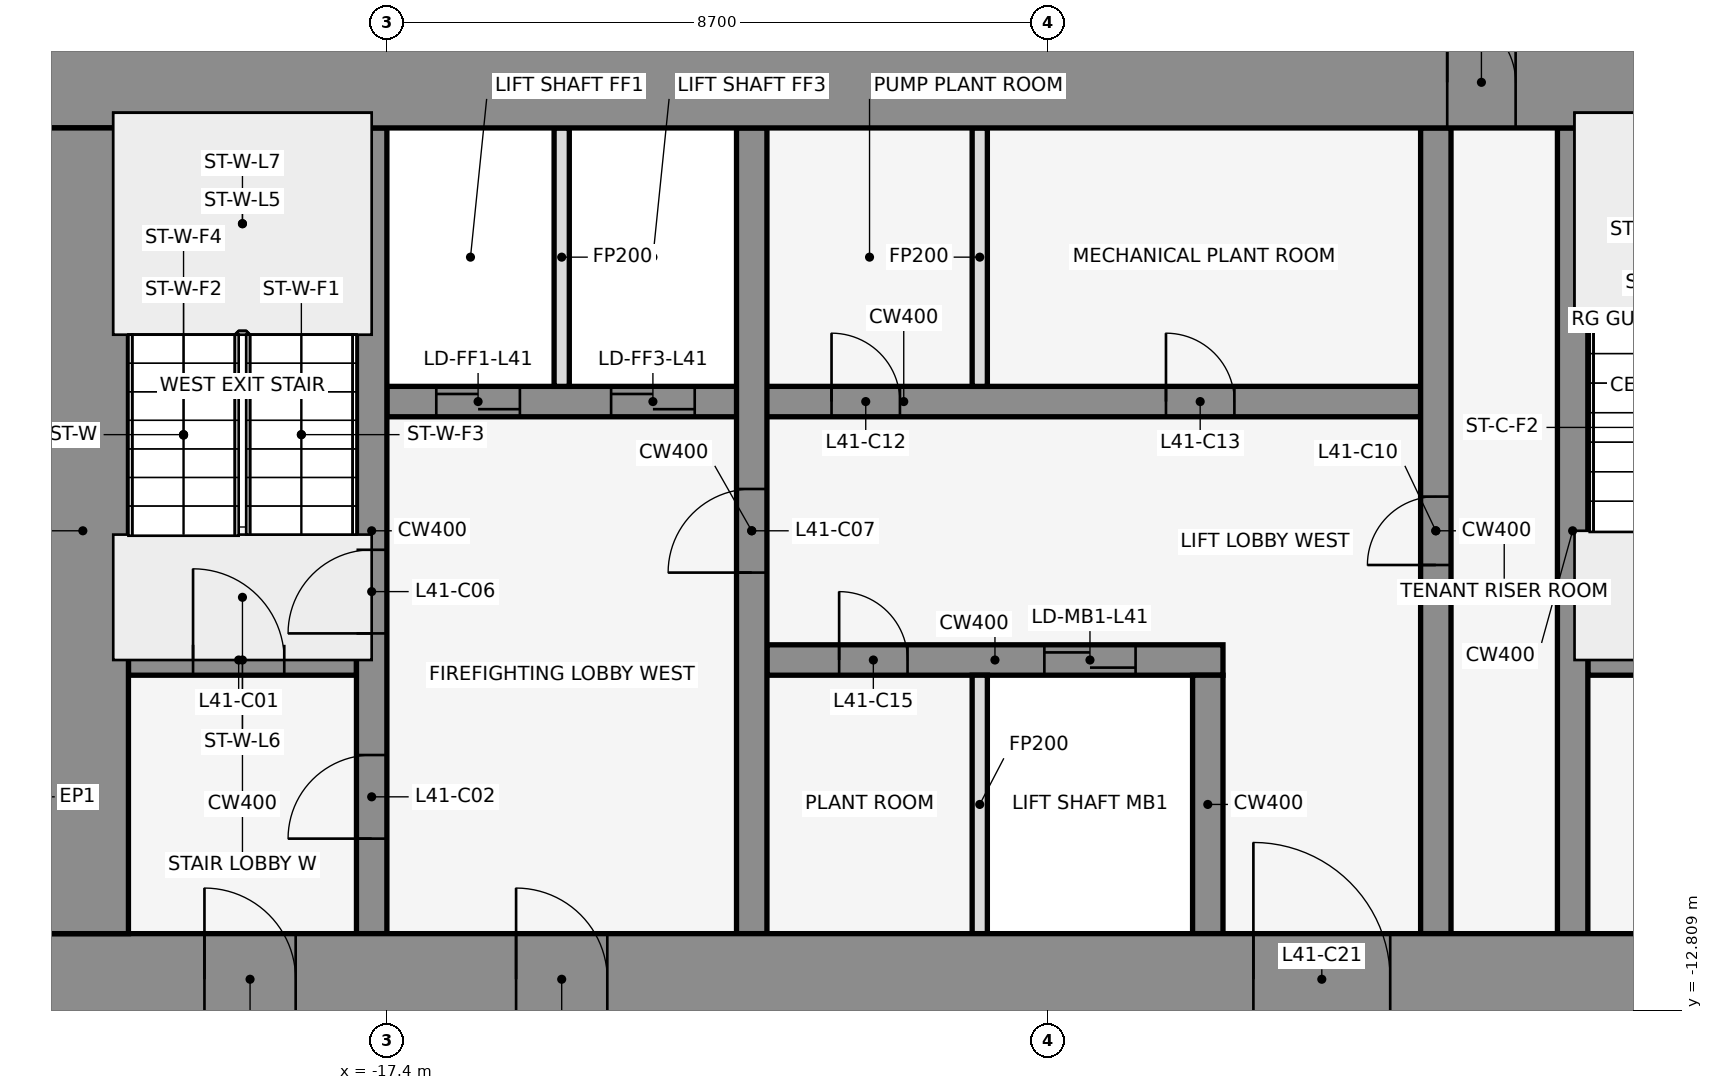
"""IFC4 building model, lengths in metres.
Left out: names, types, materials, properties, quantities, classifications, styles, units other than length and angle.
Written with IfcOpenShell. Run it as: python <this file> out.ifc"""

import sys

from ifc_helpers import new_model, si_unit, direction, frame, frame_2d, origin, place, context, subcontext, project, spatial, rectangle, extrude, element, fill, save


model = new_model("IFC4")
c1 = context("Model", 3, precision=1e-05, world=origin(), true_north=direction((0.0, 1.0)))
c2 = subcontext(c1, "Body", "Model", "MODEL_VIEW")
j1 = project(units=[si_unit("LENGTHUNIT", "METRE"), si_unit("PLANEANGLEUNIT", "RADIAN")], contexts=[c1])
p1 = place(None, origin())
s1 = spatial("IfcSite", under=j1, at=p1, CompositionType="ELEMENT")
p2 = place(p1, origin())
s2 = spatial("IfcBuilding", under=s1, at=p2, CompositionType="ELEMENT")
p3 = place(p2, frame((0.0, 0.0, 185.5)))
s3 = spatial("IfcBuildingStorey", under=s2, at=p3, CompositionType="ELEMENT", Elevation=185.5)
for number, where, z_axis, x_axis in (
    (1, (-0.068, -0.105, 0.0), (0.0, 0.0, 1.0), (-0.84, 0.543, 0.0)),
    (2, (-14.599, 1.08, 0.0), (0.0, 0.0, 1.0), (-0.84, -0.543, 0.0)),
):
    element("IfcWall", number, at=place(p3, frame(where, z_axis=z_axis, x_axis=x_axis)), inside=s3, PredefinedType="STANDARD", context=c2, shape_type="SweptSolid", body=[
        extrude(rectangle(XDim=2.183, YDim=0.25, at=frame_2d((1.091, 0.0))), origin(), (0.0, 0.0, 1.0), 5.25),
    ])
p4 = place(p3, frame((-20.8, -8.2, 0.0), z_axis=(0.0, 0.0, 1.0), x_axis=(1.0, 0.0, 0.0)))
e3 = element("IfcWall", 3, at=p4, inside=s3, PredefinedType="SHEAR", context=c2, shape_type="SweptSolid", body=[
    extrude(rectangle(XDim=3.0, YDim=0.4, at=frame_2d((1.5, 0.0))), origin(), (0.0, 0.0, 1.0), 5.4),
])
p5 = place(p4, frame((0.85, 0.0, 0.0)))
e4 = element("IfcOpeningElement", 4, at=p5, cuts=e3, PredefinedType="OPENING", context=c2, shape_type="SweptSolid", body=[
    extrude(rectangle(XDim=1.2, YDim=2.1, at=frame_2d((0.6, 1.05))), frame((0.0, 0.212, 0.0), z_axis=(0.0, -1.0, 0.0), x_axis=(1.0, 0.0, 0.0)), (0.0, 0.0, 1.0), 0.424),
])
p6 = place(p3, frame((-12.4, -8.2, 0.0), z_axis=(0.0, 0.0, 1.0), x_axis=(1.0, 0.0, 0.0)))
e5 = element("IfcWall", 5, at=p6, inside=s3, PredefinedType="SHEAR", context=c2, shape_type="SweptSolid", body=[
    extrude(rectangle(XDim=6.0, YDim=0.4, at=frame_2d((3.0, 0.0))), origin(), (0.0, 0.0, 1.0), 5.4),
])
p7 = place(p6, frame((3.65, 0.0, 0.0)))
e6 = element("IfcOpeningElement", 6, at=p7, cuts=e5, PredefinedType="OPENING", context=c2, shape_type="SweptSolid", body=[
    extrude(rectangle(XDim=1.2, YDim=2.1, at=frame_2d((0.6, 1.05))), frame((0.0, 0.212, 0.0), z_axis=(0.0, -1.0, 0.0), x_axis=(1.0, 0.0, 0.0)), (0.0, 0.0, 1.0), 0.424),
])
p8 = place(p6, frame((0.95, 0.0, 0.0)))
e7 = element("IfcOpeningElement", 7, at=p8, cuts=e5, PredefinedType="OPENING", context=c2, shape_type="SweptSolid", body=[
    extrude(rectangle(XDim=0.9, YDim=2.1, at=frame_2d((0.45, 1.05))), frame((0.0, 0.212, 0.0), z_axis=(0.0, -1.0, 0.0), x_axis=(1.0, 0.0, 0.0)), (0.0, 0.0, 1.0), 0.424),
])
p9 = place(p3, frame((-1.6, -8.2, 0.0), z_axis=(0.0, 0.0, 1.0), x_axis=(1.0, 0.0, 0.0)))
e8 = element("IfcWall", 8, at=p9, inside=s3, PredefinedType="SHEAR", context=c2, shape_type="SweptSolid", body=[
    extrude(rectangle(XDim=3.2, YDim=0.4, at=frame_2d((1.6, 0.0))), origin(), (0.0, 0.0, 1.0), 5.4),
])
p10 = place(p9, frame((1.05, 0.0, 0.0)))
e9 = element("IfcOpeningElement", 9, at=p10, cuts=e8, PredefinedType="OPENING", context=c2, shape_type="SweptSolid", body=[
    extrude(rectangle(XDim=1.2, YDim=2.1, at=frame_2d((0.6, 1.05))), frame((0.0, 0.212, 0.0), z_axis=(0.0, -1.0, 0.0), x_axis=(1.0, 0.0, 0.0)), (0.0, 0.0, 1.0), 0.424),
])
p11 = place(p3, frame((-17.4, -4.8, 0.0), z_axis=(0.0, 0.0, 1.0), x_axis=(1.0, 0.0, 0.0)))
e10 = element("IfcWall", 10, at=p11, inside=s3, PredefinedType="SHEAR", context=c2, shape_type="SweptSolid", body=[
    extrude(rectangle(XDim=13.6, YDim=0.4, at=frame_2d((6.8, 0.0))), origin(), (0.0, 0.0, 1.0), 5.4),
])
p12 = place(p11, frame((0.65, 0.0, 0.0)))
e11 = element("IfcOpeningElement", 11, at=p12, cuts=e10, PredefinedType="OPENING", context=c2, shape_type="SweptSolid", body=[
    extrude(rectangle(XDim=1.1, YDim=2.1, at=frame_2d((0.55, 1.05))), frame((0.0, 0.212, 0.0), z_axis=(0.0, -1.0, 0.0), x_axis=(1.0, 0.0, 0.0)), (0.0, 0.0, 1.0), 0.424),
])
p13 = place(p11, frame((2.95, 0.0, 0.0)))
e12 = element("IfcOpeningElement", 12, at=p13, cuts=e10, PredefinedType="OPENING", context=c2, shape_type="SweptSolid", body=[
    extrude(rectangle(XDim=1.1, YDim=2.1, at=frame_2d((0.55, 1.05))), frame((0.0, 0.212, 0.0), z_axis=(0.0, -1.0, 0.0), x_axis=(1.0, 0.0, 0.0)), (0.0, 0.0, 1.0), 0.424),
])
p14 = place(p11, frame((5.85, 0.0, 0.0)))
e13 = element("IfcOpeningElement", 13, at=p14, cuts=e10, PredefinedType="OPENING", context=c2, shape_type="SweptSolid", body=[
    extrude(rectangle(XDim=0.9, YDim=2.1, at=frame_2d((0.45, 1.05))), frame((0.0, 0.212, 0.0), z_axis=(0.0, -1.0, 0.0), x_axis=(1.0, 0.0, 0.0)), (0.0, 0.0, 1.0), 0.424),
])
p15 = place(p11, frame((10.25, 0.0, 0.0)))
e14 = element("IfcOpeningElement", 14, at=p15, cuts=e10, PredefinedType="OPENING", context=c2, shape_type="SweptSolid", body=[
    extrude(rectangle(XDim=0.9, YDim=2.1, at=frame_2d((0.45, 1.05))), frame((0.0, 0.212, 0.0), z_axis=(0.0, -1.0, 0.0), x_axis=(1.0, 0.0, 0.0)), (0.0, 0.0, 1.0), 0.424),
])
p16 = place(p3, frame((-17.6, -11.8, 0.0), z_axis=(0.0, 0.0, 1.0), x_axis=(0.0, 1.0, 0.0)))
e15 = element("IfcWall", 15, at=p16, inside=s3, PredefinedType="SHEAR", context=c2, shape_type="SweptSolid", body=[
    extrude(rectangle(XDim=10.6, YDim=0.4, at=frame_2d((5.3, 0.0))), origin(), (0.0, 0.0, 1.0), 5.4),
])
p17 = place(p16, frame((1.25, 0.0, 0.0)))
e16 = element("IfcOpeningElement", 16, at=p17, cuts=e15, PredefinedType="OPENING", context=c2, shape_type="SweptSolid", body=[
    extrude(rectangle(XDim=1.1, YDim=2.1, at=frame_2d((0.55, 1.05))), frame((0.0, 0.212, 0.0), z_axis=(0.0, -1.0, 0.0), x_axis=(1.0, 0.0, 0.0)), (0.0, 0.0, 1.0), 0.424),
])
p18 = place(p16, frame((3.95, 0.0, 0.0)))
e17 = element("IfcOpeningElement", 17, at=p18, cuts=e15, PredefinedType="OPENING", context=c2, shape_type="SweptSolid", body=[
    extrude(rectangle(XDim=1.1, YDim=2.1, at=frame_2d((0.55, 1.05))), frame((0.0, 0.212, 0.0), z_axis=(0.0, -1.0, 0.0), x_axis=(1.0, 0.0, 0.0)), (0.0, 0.0, 1.0), 0.424),
])
p19 = place(p3, frame((-15.1, -4.6, 0.0), z_axis=(0.0, 0.0, 1.0), x_axis=(0.0, 1.0, 0.0)))
e18 = element("IfcWall", 18, at=p19, inside=s3, PredefinedType="PARTITIONING", context=c2, shape_type="SweptSolid", body=[
    extrude(rectangle(XDim=3.4, YDim=0.2, at=frame_2d((1.7, 0.0))), origin(), (0.0, 0.0, 1.0), 4.26),
])
p20 = place(p3, frame((-12.6, -11.8, 0.0), z_axis=(0.0, 0.0, 1.0), x_axis=(0.0, 1.0, 0.0)))
e19 = element("IfcWall", 19, at=p20, inside=s3, PredefinedType="SHEAR", context=c2, shape_type="SweptSolid", body=[
    extrude(rectangle(XDim=10.6, YDim=0.4, at=frame_2d((5.3, 0.0))), origin(), (0.0, 0.0, 1.0), 5.4),
])
p21 = place(p20, frame((4.75, 0.0, 0.0)))
e20 = element("IfcOpeningElement", 20, at=p21, cuts=e19, PredefinedType="OPENING", context=c2, shape_type="SweptSolid", body=[
    extrude(rectangle(XDim=1.1, YDim=2.1, at=frame_2d((0.55, 1.05))), frame((0.0, 0.212, 0.0), z_axis=(0.0, -1.0, 0.0), x_axis=(1.0, 0.0, 0.0)), (0.0, 0.0, 1.0), 0.424),
])
for number, where, z_axis, x_axis in (
    (21, (-9.6, -11.8, 0.0), (0.0, 0.0, 1.0), (0.0, 1.0, 0.0)),
    (22, (-9.6, -4.6, 0.0), (0.0, 0.0, 1.0), (0.0, 1.0, 0.0)),
):
    element("IfcWall", number, at=place(p3, frame(where, z_axis=z_axis, x_axis=x_axis)), inside=s3, PredefinedType="PARTITIONING", context=c2, shape_type="SweptSolid", body=[
        extrude(rectangle(XDim=3.4, YDim=0.2, at=frame_2d((1.7, 0.0))), origin(), (0.0, 0.0, 1.0), 4.26),
    ])
p22 = place(p3, frame((-6.6, -11.8, 0.0), z_axis=(0.0, 0.0, 1.0), x_axis=(0.0, 1.0, 0.0)))
e23 = element("IfcWall", 23, at=p22, inside=s3, PredefinedType="SHEAR", context=c2, shape_type="SweptSolid", body=[
    extrude(rectangle(XDim=3.4, YDim=0.4, at=frame_2d((1.7, 0.0))), origin(), (0.0, 0.0, 1.0), 5.4),
])
p23 = place(p3, frame((-3.6, -11.8, 0.0), z_axis=(0.0, 0.0, 1.0), x_axis=(0.0, 1.0, 0.0)))
e24 = element("IfcWall", 24, at=p23, inside=s3, PredefinedType="SHEAR", context=c2, shape_type="SweptSolid", body=[
    extrude(rectangle(XDim=10.6, YDim=0.4, at=frame_2d((5.3, 0.0))), origin(), (0.0, 0.0, 1.0), 5.4),
])
p24 = place(p23, frame((4.85, 0.0, 0.0)))
e25 = element("IfcOpeningElement", 25, at=p24, cuts=e24, PredefinedType="OPENING", context=c2, shape_type="SweptSolid", body=[
    extrude(rectangle(XDim=0.9, YDim=2.1, at=frame_2d((0.45, 1.05))), frame((0.0, 0.212, 0.0), z_axis=(0.0, -1.0, 0.0), x_axis=(1.0, 0.0, 0.0)), (0.0, 0.0, 1.0), 0.424),
])
p25 = place(p3, frame((-1.8, -11.8, 0.0), z_axis=(0.0, 0.0, 1.0), x_axis=(0.0, 1.0, 0.0)))
e26 = element("IfcWall", 26, at=p25, inside=s3, PredefinedType="SHEAR", context=c2, shape_type="SweptSolid", body=[
    extrude(rectangle(XDim=10.6, YDim=0.4, at=frame_2d((5.3, 0.0))), origin(), (0.0, 0.0, 1.0), 5.4),
])
p26 = place(p3, frame((-22.0, -0.6, 0.0), z_axis=(0.0, 0.0, 1.0), x_axis=(1.0, 0.0, 0.0)))
e27 = element("IfcWall", 27, at=p26, inside=s3, PredefinedType="SHEAR", context=c2, shape_type="SweptSolid", body=[
    extrude(rectangle(XDim=44.0, YDim=1.2, at=frame_2d((22.0, 0.0))), origin(), (0.0, 0.0, 1.0), 5.4),
])
p27 = place(p26, frame((18.55, 0.0, 0.0)))
e28 = element("IfcOpeningElement", 28, at=p27, cuts=e27, PredefinedType="OPENING", context=c2, shape_type="SweptSolid", body=[
    extrude(rectangle(XDim=0.9, YDim=2.1, at=frame_2d((0.45, 1.05))), frame((0.0, 0.612, 0.0), z_axis=(0.0, -1.0, 0.0), x_axis=(1.0, 0.0, 0.0)), (0.0, 0.0, 1.0), 1.224),
])
p28 = place(p26, frame((24.55, 0.0, 0.0)))
e29 = element("IfcOpeningElement", 29, at=p28, cuts=e27, PredefinedType="OPENING", context=c2, shape_type="SweptSolid", body=[
    extrude(rectangle(XDim=0.9, YDim=2.1, at=frame_2d((0.45, 1.05))), frame((0.0, 0.612, 0.0), z_axis=(0.0, -1.0, 0.0), x_axis=(1.0, 0.0, 0.0)), (0.0, 0.0, 1.0), 1.224),
])
p29 = place(p3, frame((-22.0, -12.4, 0.0), z_axis=(0.0, 0.0, 1.0), x_axis=(1.0, 0.0, 0.0)))
e30 = element("IfcWall", 30, at=p29, inside=s3, PredefinedType="SHEAR", context=c2, shape_type="SweptSolid", body=[
    extrude(rectangle(XDim=44.0, YDim=1.2, at=frame_2d((22.0, 0.0))), origin(), (0.0, 0.0, 1.0), 5.4),
])
p30 = place(p29, frame((2.2, 0.0, 0.0)))
e31 = element("IfcOpeningElement", 31, at=p30, cuts=e30, PredefinedType="OPENING", context=c2, shape_type="SweptSolid", body=[
    extrude(rectangle(XDim=1.2, YDim=2.1, at=frame_2d((0.6, 1.05))), frame((0.0, 0.612, 0.0), z_axis=(0.0, -1.0, 0.0), x_axis=(1.0, 0.0, 0.0)), (0.0, 0.0, 1.0), 1.224),
])
p31 = place(p29, frame((21.4, 0.0, 0.0)))
e32 = element("IfcOpeningElement", 32, at=p31, cuts=e30, PredefinedType="OPENING", context=c2, shape_type="SweptSolid", body=[
    extrude(rectangle(XDim=1.2, YDim=2.1, at=frame_2d((0.6, 1.05))), frame((0.0, 0.612, 0.0), z_axis=(0.0, -1.0, 0.0), x_axis=(1.0, 0.0, 0.0)), (0.0, 0.0, 1.0), 1.224),
])
p32 = place(p29, frame((40.6, 0.0, 0.0)))
e33 = element("IfcOpeningElement", 33, at=p32, cuts=e30, PredefinedType="OPENING", context=c2, shape_type="SweptSolid", body=[
    extrude(rectangle(XDim=1.2, YDim=2.1, at=frame_2d((0.6, 1.05))), frame((0.0, 0.612, 0.0), z_axis=(0.0, -1.0, 0.0), x_axis=(1.0, 0.0, 0.0)), (0.0, 0.0, 1.0), 1.224),
])
p33 = place(p29, frame((16.0, 0.0, 0.0)))
e34 = element("IfcOpeningElement", 34, at=p33, cuts=e30, PredefinedType="OPENING", context=c2, shape_type="SweptSolid", body=[
    extrude(rectangle(XDim=1.8, YDim=2.1, at=frame_2d((0.9, 1.05))), frame((0.0, 0.612, 0.0), z_axis=(0.0, -1.0, 0.0), x_axis=(1.0, 0.0, 0.0)), (0.0, 0.0, 1.0), 1.224),
])
p34 = place(p29, frame((6.3, 0.0, 0.0)))
e35 = element("IfcOpeningElement", 35, at=p34, cuts=e30, PredefinedType="OPENING", context=c2, shape_type="SweptSolid", body=[
    extrude(rectangle(XDim=1.2, YDim=2.1, at=frame_2d((0.6, 1.05))), frame((0.0, 0.612, 0.0), z_axis=(0.0, -1.0, 0.0), x_axis=(1.0, 0.0, 0.0)), (0.0, 0.0, 1.0), 1.224),
])
p35 = place(p29, frame((26.2, 0.0, 0.0)))
e36 = element("IfcOpeningElement", 36, at=p35, cuts=e30, PredefinedType="OPENING", context=c2, shape_type="SweptSolid", body=[
    extrude(rectangle(XDim=1.8, YDim=2.1, at=frame_2d((0.9, 1.05))), frame((0.0, 0.612, 0.0), z_axis=(0.0, -1.0, 0.0), x_axis=(1.0, 0.0, 0.0)), (0.0, 0.0, 1.0), 1.224),
])
p36 = place(p29, frame((36.5, 0.0, 0.0)))
e37 = element("IfcOpeningElement", 37, at=p36, cuts=e30, PredefinedType="OPENING", context=c2, shape_type="SweptSolid", body=[
    extrude(rectangle(XDim=1.2, YDim=2.1, at=frame_2d((0.6, 1.05))), frame((0.0, 0.612, 0.0), z_axis=(0.0, -1.0, 0.0), x_axis=(1.0, 0.0, 0.0)), (0.0, 0.0, 1.0), 1.224),
])
p37 = place(p3, frame((-21.4, -11.8, 0.0), z_axis=(0.0, 0.0, 1.0), x_axis=(0.0, 1.0, 0.0)))
e38 = element("IfcWall", 38, at=p37, inside=s3, PredefinedType="SHEAR", context=c2, shape_type="SweptSolid", body=[
    extrude(rectangle(XDim=10.6, YDim=1.2, at=frame_2d((5.3, 0.0))), origin(), (0.0, 0.0, 1.0), 5.4),
])
p38 = place(p5, origin())
e39 = element("IfcDoor", 39, at=p38, inside=s3, OperationType="SINGLE_SWING_LEFT", PredefinedType="DOOR", context=c2, shape_type="SweptSolid", body=[
    extrude(rectangle(XDim=1.2, YDim=2.1, at=frame_2d((0.6, 1.05))), frame((0.0, 0.025, 0.0), z_axis=(0.0, -1.0, 0.0), x_axis=(1.0, 0.0, 0.0)), (0.0, 0.0, 1.0), 0.05),
])
fill(e4, e39)
p39 = place(p17, frame((1.1, 0.0, 0.0), z_axis=(0.0, 0.0, 1.0), x_axis=(-1.0, 0.0, 0.0)))
e40 = element("IfcDoor", 40, at=p39, inside=s3, OperationType="SINGLE_SWING_LEFT", PredefinedType="DOOR", context=c2, shape_type="SweptSolid", body=[
    extrude(rectangle(XDim=1.1, YDim=2.1, at=frame_2d((0.55, 1.05))), frame((0.0, 0.025, 0.0), z_axis=(0.0, -1.0, 0.0), x_axis=(1.0, 0.0, 0.0)), (0.0, 0.0, 1.0), 0.05),
])
fill(e16, e40)
p40 = place(p12, origin())
e41 = element("IfcDoor", 41, at=p40, inside=s3, OperationType="DOUBLE_DOOR_SLIDING", PredefinedType="DOOR", context=c2, shape_type="SweptSolid", body=[
    extrude(rectangle(XDim=1.1, YDim=2.1, at=frame_2d((0.55, 1.05))), frame((0.0, 0.025, 0.0), z_axis=(0.0, -1.0, 0.0), x_axis=(1.0, 0.0, 0.0)), (0.0, 0.0, 1.0), 0.05),
])
fill(e11, e41)
p41 = place(p13, origin())
e42 = element("IfcDoor", 42, at=p41, inside=s3, OperationType="DOUBLE_DOOR_SLIDING", PredefinedType="DOOR", context=c2, shape_type="SweptSolid", body=[
    extrude(rectangle(XDim=1.1, YDim=2.1, at=frame_2d((0.55, 1.05))), frame((0.0, 0.025, 0.0), z_axis=(0.0, -1.0, 0.0), x_axis=(1.0, 0.0, 0.0)), (0.0, 0.0, 1.0), 0.05),
])
fill(e12, e42)
p42 = place(p7, origin())
e43 = element("IfcDoor", 43, at=p42, inside=s3, OperationType="DOUBLE_DOOR_SLIDING", PredefinedType="DOOR", context=c2, shape_type="SweptSolid", body=[
    extrude(rectangle(XDim=1.2, YDim=2.1, at=frame_2d((0.6, 1.05))), frame((0.0, 0.025, 0.0), z_axis=(0.0, -1.0, 0.0), x_axis=(1.0, 0.0, 0.0)), (0.0, 0.0, 1.0), 0.05),
])
fill(e6, e43)
p43 = place(p18, frame((1.1, 0.0, 0.0), z_axis=(0.0, 0.0, 1.0), x_axis=(-1.0, 0.0, 0.0)))
e44 = element("IfcDoor", 44, at=p43, inside=s3, OperationType="SINGLE_SWING_LEFT", PredefinedType="DOOR", context=c2, shape_type="SweptSolid", body=[
    extrude(rectangle(XDim=1.1, YDim=2.1, at=frame_2d((0.55, 1.05))), frame((0.0, 0.025, 0.0), z_axis=(0.0, -1.0, 0.0), x_axis=(1.0, 0.0, 0.0)), (0.0, 0.0, 1.0), 0.05),
])
fill(e17, e44)
p44 = place(p21, origin())
e45 = element("IfcDoor", 45, at=p44, inside=s3, OperationType="SINGLE_SWING_LEFT", PredefinedType="DOOR", context=c2, shape_type="SweptSolid", body=[
    extrude(rectangle(XDim=1.1, YDim=2.1, at=frame_2d((0.55, 1.05))), frame((0.0, 0.025, 0.0), z_axis=(0.0, -1.0, 0.0), x_axis=(1.0, 0.0, 0.0)), (0.0, 0.0, 1.0), 0.05),
])
fill(e20, e45)
p45 = place(p24, frame((0.9, 0.0, 0.0), z_axis=(0.0, 0.0, 1.0), x_axis=(-1.0, 0.0, 0.0)))
e46 = element("IfcDoor", 46, at=p45, inside=s3, OperationType="SINGLE_SWING_LEFT", PredefinedType="DOOR", context=c2, shape_type="SweptSolid", body=[
    extrude(rectangle(XDim=0.9, YDim=2.1, at=frame_2d((0.45, 1.05))), frame((0.0, 0.025, 0.0), z_axis=(0.0, -1.0, 0.0), x_axis=(1.0, 0.0, 0.0)), (0.0, 0.0, 1.0), 0.05),
])
fill(e25, e46)
p46 = place(p14, origin())
e47 = element("IfcDoor", 47, at=p46, inside=s3, OperationType="SINGLE_SWING_RIGHT", PredefinedType="DOOR", context=c2, shape_type="SweptSolid", body=[
    extrude(rectangle(XDim=0.9, YDim=2.1, at=frame_2d((0.45, 1.05))), frame((0.0, 0.025, 0.0), z_axis=(0.0, -1.0, 0.0), x_axis=(1.0, 0.0, 0.0)), (0.0, 0.0, 1.0), 0.05),
])
fill(e13, e47)
p47 = place(p15, origin())
e48 = element("IfcDoor", 48, at=p47, inside=s3, OperationType="SINGLE_SWING_LEFT", PredefinedType="DOOR", context=c2, shape_type="SweptSolid", body=[
    extrude(rectangle(XDim=0.9, YDim=2.1, at=frame_2d((0.45, 1.05))), frame((0.0, 0.025, 0.0), z_axis=(0.0, -1.0, 0.0), x_axis=(1.0, 0.0, 0.0)), (0.0, 0.0, 1.0), 0.05),
])
fill(e14, e48)
p48 = place(p8, frame((0.9, 0.0, 0.0), z_axis=(0.0, 0.0, 1.0), x_axis=(-1.0, 0.0, 0.0)))
e49 = element("IfcDoor", 49, at=p48, inside=s3, OperationType="SINGLE_SWING_RIGHT", PredefinedType="DOOR", context=c2, shape_type="SweptSolid", body=[
    extrude(rectangle(XDim=0.9, YDim=2.1, at=frame_2d((0.45, 1.05))), frame((0.0, 0.025, 0.0), z_axis=(0.0, -1.0, 0.0), x_axis=(1.0, 0.0, 0.0)), (0.0, 0.0, 1.0), 0.05),
])
fill(e7, e49)
p49 = place(p27, origin())
e50 = element("IfcDoor", 50, at=p49, inside=s3, OperationType="SINGLE_SWING_LEFT", PredefinedType="DOOR", context=c2, shape_type="SweptSolid", body=[
    extrude(rectangle(XDim=0.9, YDim=2.1, at=frame_2d((0.45, 1.05))), frame((0.0, 0.025, 0.0), z_axis=(0.0, -1.0, 0.0), x_axis=(1.0, 0.0, 0.0)), (0.0, 0.0, 1.0), 0.05),
])
fill(e28, e50)
p50 = place(p30, frame((1.2, 0.0, 0.0), z_axis=(0.0, 0.0, 1.0), x_axis=(-1.0, 0.0, 0.0)))
e51 = element("IfcDoor", 51, at=p50, inside=s3, OperationType="SINGLE_SWING_RIGHT", PredefinedType="DOOR", context=c2, shape_type="SweptSolid", body=[
    extrude(rectangle(XDim=1.2, YDim=2.1, at=frame_2d((0.6, 1.05))), frame((0.0, 0.025, 0.0), z_axis=(0.0, -1.0, 0.0), x_axis=(1.0, 0.0, 0.0)), (0.0, 0.0, 1.0), 0.05),
])
fill(e31, e51)
p51 = place(p33, origin())
e52 = element("IfcDoor", 52, at=p51, inside=s3, OperationType="SINGLE_SWING_LEFT", PredefinedType="DOOR", context=c2, shape_type="SweptSolid", body=[
    extrude(rectangle(XDim=1.8, YDim=2.1, at=frame_2d((0.9, 1.05))), frame((0.0, 0.025, 0.0), z_axis=(0.0, -1.0, 0.0), x_axis=(1.0, 0.0, 0.0)), (0.0, 0.0, 1.0), 0.05),
])
fill(e34, e52)
p52 = place(p34, frame((1.2, 0.0, 0.0), z_axis=(0.0, 0.0, 1.0), x_axis=(-1.0, 0.0, 0.0)))
e53 = element("IfcDoor", 53, at=p52, inside=s3, OperationType="SINGLE_SWING_RIGHT", PredefinedType="DOOR", context=c2, shape_type="SweptSolid", body=[
    extrude(rectangle(XDim=1.2, YDim=2.1, at=frame_2d((0.6, 1.05))), frame((0.0, 0.025, 0.0), z_axis=(0.0, -1.0, 0.0), x_axis=(1.0, 0.0, 0.0)), (0.0, 0.0, 1.0), 0.05),
])
fill(e35, e53)
save(model, sys.argv[1])
